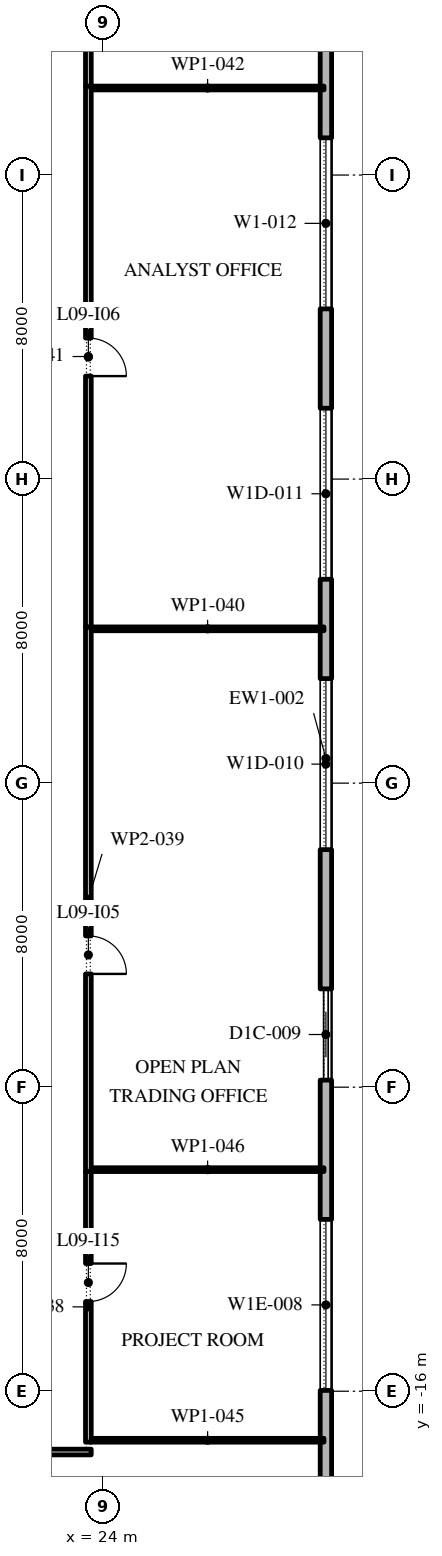
"""IFC4 building model, lengths in metres.
Left out: names, types, materials, properties, quantities, classifications, styles, units other than length and angle.
Written with IfcOpenShell. Run it as: python <this file> out.ifc"""

import sys

from ifc_helpers import new_model, si_unit, direction, frame, frame_2d, origin, place, context, subcontext, project, spatial, rectangle, extrude, element, fill, save


model = new_model("IFC4")
c1 = context("Model", 3, precision=1e-05, world=origin(), true_north=direction((0.0, 1.0)))
c2 = subcontext(c1, "Body", "Model", "MODEL_VIEW")
j1 = project(units=[si_unit("LENGTHUNIT", "METRE"), si_unit("PLANEANGLEUNIT", "RADIAN")], contexts=[c1])
p1 = place(None, origin())
s1 = spatial("IfcSite", under=j1, at=p1, CompositionType="ELEMENT")
p2 = place(p1, origin())
s2 = spatial("IfcBuilding", under=s1, at=p2, CompositionType="ELEMENT")
p3 = place(p2, frame((0.0, 0.0, 48.0)))
s3 = spatial("IfcBuildingStorey", under=s2, at=p3, CompositionType="ELEMENT", Elevation=48.0)
p4 = place(p3, frame((29.85, -24.1, 0.0), z_axis=(0.0, 0.0, 1.0), x_axis=(0.0, 1.0, 0.0)))
e1 = element("IfcWall", 1, at=p4, inside=s3, PredefinedType="STANDARD", context=c2, shape_type="SweptSolid", body=[
    extrude(rectangle(XDim=49.5, YDim=0.3, at=frame_2d((24.75, 0.0))), origin(), (0.0, 0.0, 1.0), 4.0),
])
p5 = place(p4, frame((1.157, 0.0, 0.45)))
e2 = element("IfcOpeningElement", 2, at=p5, cuts=e1, PredefinedType="OPENING", context=c2, shape_type="SweptSolid", body=[
    extrude(rectangle(XDim=4.5, YDim=3.05, at=frame_2d((2.25, 1.525))), frame((0.0, 0.16, 0.0), z_axis=(0.0, -1.0, 0.0), x_axis=(1.0, 0.0, 0.0)), (0.0, 0.0, 1.0), 0.32),
])
p6 = place(p4, frame((8.121, 0.0, 0.45)))
e3 = element("IfcOpeningElement", 3, at=p6, cuts=e1, PredefinedType="OPENING", context=c2, shape_type="SweptSolid", body=[
    extrude(rectangle(XDim=4.5, YDim=2.825, at=frame_2d((2.25, 1.413))), frame((0.0, 0.16, 0.0), z_axis=(0.0, -1.0, 0.0), x_axis=(1.0, 0.0, 0.0)), (0.0, 0.0, 1.0), 0.32),
])
p7 = place(p4, frame((16.286, 0.0, 0.0)))
e4 = element("IfcOpeningElement", 4, at=p7, cuts=e1, PredefinedType="OPENING", context=c2, shape_type="SweptSolid", body=[
    extrude(rectangle(XDim=2.4, YDim=3.325, at=frame_2d((1.2, 1.663))), frame((0.0, 0.16, 0.0), z_axis=(0.0, -1.0, 0.0), x_axis=(1.0, 0.0, 0.0)), (0.0, 0.0, 1.0), 0.32),
])
p8 = place(p4, frame((22.35, 0.0, 0.45)))
e5 = element("IfcOpeningElement", 5, at=p8, cuts=e1, PredefinedType="OPENING", context=c2, shape_type="SweptSolid", body=[
    extrude(rectangle(XDim=4.5, YDim=2.875, at=frame_2d((2.25, 1.438))), frame((0.0, 0.16, 0.0), z_axis=(0.0, -1.0, 0.0), x_axis=(1.0, 0.0, 0.0)), (0.0, 0.0, 1.0), 0.32),
])
p9 = place(p4, frame((29.464, 0.0, 0.45)))
e6 = element("IfcOpeningElement", 6, at=p9, cuts=e1, PredefinedType="OPENING", context=c2, shape_type="SweptSolid", body=[
    extrude(rectangle(XDim=4.5, YDim=2.875, at=frame_2d((2.25, 1.438))), frame((0.0, 0.16, 0.0), z_axis=(0.0, -1.0, 0.0), x_axis=(1.0, 0.0, 0.0)), (0.0, 0.0, 1.0), 0.32),
])
p10 = place(p4, frame((36.579, 0.0, 0.45)))
e7 = element("IfcOpeningElement", 7, at=p10, cuts=e1, PredefinedType="OPENING", context=c2, shape_type="SweptSolid", body=[
    extrude(rectangle(XDim=4.5, YDim=3.05, at=frame_2d((2.25, 1.525))), frame((0.0, 0.16, 0.0), z_axis=(0.0, -1.0, 0.0), x_axis=(1.0, 0.0, 0.0)), (0.0, 0.0, 1.0), 0.32),
])
p11 = place(p4, frame((44.743, 0.0, 0.0)))
e8 = element("IfcOpeningElement", 8, at=p11, cuts=e1, PredefinedType="OPENING", context=c2, shape_type="SweptSolid", body=[
    extrude(rectangle(XDim=2.4, YDim=3.325, at=frame_2d((1.2, 1.663))), frame((0.0, 0.16, 0.0), z_axis=(0.0, -1.0, 0.0), x_axis=(1.0, 0.0, 0.0)), (0.0, 0.0, 1.0), 0.32),
])
p12 = place(p3, frame((23.675, -17.6, 0.0), z_axis=(0.0, 0.0, 1.0), x_axis=(-1.0, 0.0, 0.0)))
e9 = element("IfcWall", 9, at=p12, inside=s3, PredefinedType="PARTITIONING", context=c2, shape_type="SweptSolid", body=[
    extrude(rectangle(XDim=8.675, YDim=0.15, at=frame_2d((4.337, 0.0))), origin(), (0.0, 0.0, 1.0), 4.0),
])
p13 = place(p12, frame((3.775, 0.0, 0.0)))
e10 = element("IfcOpeningElement", 10, at=p13, cuts=e9, PredefinedType="OPENING", context=c2, shape_type="SweptSolid", body=[
    extrude(rectangle(XDim=1.0, YDim=2.1, at=frame_2d((0.5, 1.05))), frame((0.0, 0.085, 0.0), z_axis=(0.0, -1.0, 0.0), x_axis=(1.0, 0.0, 0.0)), (0.0, 0.0, 1.0), 0.17),
])
p14 = place(p3, frame((23.6, -10.22, 0.0), z_axis=(0.0, 0.0, 1.0), x_axis=(0.0, -1.0, 0.0)))
e11 = element("IfcWall", 11, at=p14, inside=s3, PredefinedType="PARTITIONING", context=c2, shape_type="SweptSolid", body=[
    extrude(rectangle(XDim=7.12, YDim=0.15, at=frame_2d((3.56, 0.0))), origin(), (0.0, 0.0, 1.0), 4.0),
])
p15 = place(p14, frame((2.42, 0.0, 0.0)))
e12 = element("IfcOpeningElement", 12, at=p15, cuts=e11, PredefinedType="OPENING", context=c2, shape_type="SweptSolid", body=[
    extrude(rectangle(XDim=1.0, YDim=2.1, at=frame_2d((0.5, 1.05))), frame((0.0, 0.085, 0.0), z_axis=(0.0, -1.0, 0.0), x_axis=(1.0, 0.0, 0.0)), (0.0, 0.0, 1.0), 0.17),
])
p16 = place(p3, frame((23.6, 4.11, 0.0), z_axis=(0.0, 0.0, 1.0), x_axis=(0.0, -1.0, 0.0)))
e13 = element("IfcWall", 13, at=p16, inside=s3, PredefinedType="PARTITIONING", context=c2, shape_type="SweptSolid", body=[
    extrude(rectangle(XDim=14.33, YDim=0.15, at=frame_2d((7.165, 0.0))), origin(), (0.0, 0.0, 1.0), 4.0),
])
p17 = place(p16, frame((8.13, 0.0, 0.0)))
e14 = element("IfcOpeningElement", 14, at=p17, cuts=e13, PredefinedType="OPENING", context=c2, shape_type="SweptSolid", body=[
    extrude(rectangle(XDim=1.0, YDim=2.1, at=frame_2d((0.5, 1.05))), frame((0.0, 0.085, 0.0), z_axis=(0.0, -1.0, 0.0), x_axis=(1.0, 0.0, 0.0)), (0.0, 0.0, 1.0), 0.17),
])
p18 = place(p3, frame((23.675, 4.06, 0.0), z_axis=(0.0, 0.0, 1.0), x_axis=(1.0, 0.0, 0.0)))
e15 = element("IfcWall", 15, at=p18, inside=s3, PredefinedType="PARTITIONING", context=c2, shape_type="SweptSolid", body=[
    extrude(rectangle(XDim=6.125, YDim=0.1, at=frame_2d((3.062, 0.0))), origin(), (0.0, 0.0, 1.0), 4.0),
])
p19 = place(p3, frame((23.6, 18.34, 0.0), z_axis=(0.0, 0.0, 1.0), x_axis=(0.0, -1.0, 0.0)))
e16 = element("IfcWall", 16, at=p19, inside=s3, PredefinedType="PARTITIONING", context=c2, shape_type="SweptSolid", body=[
    extrude(rectangle(XDim=14.23, YDim=0.15, at=frame_2d((7.115, 0.0))), origin(), (0.0, 0.0, 1.0), 4.0),
])
p20 = place(p19, frame((6.63, 0.0, 0.0)))
e17 = element("IfcOpeningElement", 17, at=p20, cuts=e16, PredefinedType="OPENING", context=c2, shape_type="SweptSolid", body=[
    extrude(rectangle(XDim=1.0, YDim=2.1, at=frame_2d((0.5, 1.05))), frame((0.0, 0.085, 0.0), z_axis=(0.0, -1.0, 0.0), x_axis=(1.0, 0.0, 0.0)), (0.0, 0.0, 1.0), 0.17),
])
p21 = place(p3, frame((23.675, 18.29, 0.0), z_axis=(0.0, 0.0, 1.0), x_axis=(1.0, 0.0, 0.0)))
e18 = element("IfcWall", 18, at=p21, inside=s3, PredefinedType="PARTITIONING", context=c2, shape_type="SweptSolid", body=[
    extrude(rectangle(XDim=6.125, YDim=0.1, at=frame_2d((3.062, 0.0))), origin(), (0.0, 0.0, 1.0), 4.0),
])
p22 = place(p3, frame((23.6, 27.05, 0.0), z_axis=(0.0, 0.0, 1.0), x_axis=(0.0, -1.0, 0.0)))
e19 = element("IfcWall", 19, at=p22, inside=s3, PredefinedType="PARTITIONING", context=c2, shape_type="SweptSolid", body=[
    extrude(rectangle(XDim=8.71, YDim=0.15, at=frame_2d((4.355, 0.0))), origin(), (0.0, 0.0, 1.0), 4.0),
])
p23 = place(p22, frame((4.86, 0.0, 0.0)))
e20 = element("IfcOpeningElement", 20, at=p23, cuts=e19, PredefinedType="OPENING", context=c2, shape_type="SweptSolid", body=[
    extrude(rectangle(XDim=1.0, YDim=2.1, at=frame_2d((0.5, 1.05))), frame((0.0, 0.085, 0.0), z_axis=(0.0, -1.0, 0.0), x_axis=(1.0, 0.0, 0.0)), (0.0, 0.0, 1.0), 0.17),
])
for number, where, z_axis, x_axis in (
    (21, (29.8, -17.29, 0.0), (0.0, 0.0, 1.0), (-1.0, 0.0, 0.0)),
    (22, (29.8, -10.17, 0.0), (0.0, 0.0, 1.0), (-1.0, 0.0, 0.0)),
):
    element("IfcWall", number, at=place(p3, frame(where, z_axis=z_axis, x_axis=x_axis)), inside=s3, PredefinedType="PARTITIONING", context=c2, shape_type="SweptSolid", body=[
        extrude(rectangle(XDim=6.125, YDim=0.1, at=frame_2d((3.062, 0.0))), origin(), (0.0, 0.0, 1.0), 4.0),
    ])
p24 = place(p6, origin())
e23 = element("IfcWindow", 23, at=p24, inside=s3, PartitioningType="DOUBLE_PANEL_VERTICAL", PredefinedType="WINDOW", context=c2, shape_type="SweptSolid", body=[
    extrude(rectangle(XDim=4.5, YDim=2.825, at=frame_2d((2.25, 1.413))), frame((0.0, 0.03, 0.0), z_axis=(0.0, -1.0, 0.0), x_axis=(1.0, 0.0, 0.0)), (0.0, 0.0, 1.0), 0.06),
])
fill(e3, e23)
p25 = place(p7, origin())
e24 = element("IfcDoor", 24, at=p25, inside=s3, OperationType="DOUBLE_DOOR_SLIDING", PredefinedType="DOOR", context=c2, shape_type="SweptSolid", body=[
    extrude(rectangle(XDim=2.4, YDim=3.325, at=frame_2d((1.2, 1.663))), frame((0.0, 0.025, 0.0), z_axis=(0.0, -1.0, 0.0), x_axis=(1.0, 0.0, 0.0)), (0.0, 0.0, 1.0), 0.05),
])
fill(e4, e24)
p26 = place(p8, origin())
e25 = element("IfcWindow", 25, at=p26, inside=s3, PartitioningType="DOUBLE_PANEL_VERTICAL", PredefinedType="WINDOW", context=c2, shape_type="SweptSolid", body=[
    extrude(rectangle(XDim=4.5, YDim=2.875, at=frame_2d((2.25, 1.438))), frame((0.0, 0.03, 0.0), z_axis=(0.0, -1.0, 0.0), x_axis=(1.0, 0.0, 0.0)), (0.0, 0.0, 1.0), 0.06),
])
fill(e5, e25)
p27 = place(p9, origin())
e26 = element("IfcWindow", 26, at=p27, inside=s3, PartitioningType="DOUBLE_PANEL_VERTICAL", PredefinedType="WINDOW", context=c2, shape_type="SweptSolid", body=[
    extrude(rectangle(XDim=4.5, YDim=2.875, at=frame_2d((2.25, 1.438))), frame((0.0, 0.03, 0.0), z_axis=(0.0, -1.0, 0.0), x_axis=(1.0, 0.0, 0.0)), (0.0, 0.0, 1.0), 0.06),
])
fill(e6, e26)
p28 = place(p10, origin())
e27 = element("IfcWindow", 27, at=p28, inside=s3, PartitioningType="DOUBLE_PANEL_VERTICAL", PredefinedType="WINDOW", context=c2, shape_type="SweptSolid", body=[
    extrude(rectangle(XDim=4.5, YDim=3.05, at=frame_2d((2.25, 1.525))), frame((0.0, 0.03, 0.0), z_axis=(0.0, -1.0, 0.0), x_axis=(1.0, 0.0, 0.0)), (0.0, 0.0, 1.0), 0.06),
])
fill(e7, e27)
p29 = place(p17, origin())
e28 = element("IfcDoor", 28, at=p29, inside=s3, OperationType="SINGLE_SWING_LEFT", PredefinedType="DOOR", context=c2, shape_type="SweptSolid", body=[
    extrude(rectangle(XDim=1.0, YDim=2.1, at=frame_2d((0.5, 1.05))), frame((0.0, 0.025, 0.0), z_axis=(0.0, -1.0, 0.0), x_axis=(1.0, 0.0, 0.0)), (0.0, 0.0, 1.0), 0.05),
])
fill(e14, e28)
p30 = place(p20, origin())
e29 = element("IfcDoor", 29, at=p30, inside=s3, OperationType="SINGLE_SWING_LEFT", PredefinedType="DOOR", context=c2, shape_type="SweptSolid", body=[
    extrude(rectangle(XDim=1.0, YDim=2.1, at=frame_2d((0.5, 1.05))), frame((0.0, 0.025, 0.0), z_axis=(0.0, -1.0, 0.0), x_axis=(1.0, 0.0, 0.0)), (0.0, 0.0, 1.0), 0.05),
])
fill(e17, e29)
p31 = place(p15, origin())
e30 = element("IfcDoor", 30, at=p31, inside=s3, OperationType="SINGLE_SWING_RIGHT", PredefinedType="DOOR", context=c2, shape_type="SweptSolid", body=[
    extrude(rectangle(XDim=1.0, YDim=2.1, at=frame_2d((0.5, 1.05))), frame((0.0, 0.025, 0.0), z_axis=(0.0, -1.0, 0.0), x_axis=(1.0, 0.0, 0.0)), (0.0, 0.0, 1.0), 0.05),
])
fill(e12, e30)
save(model, sys.argv[1])
